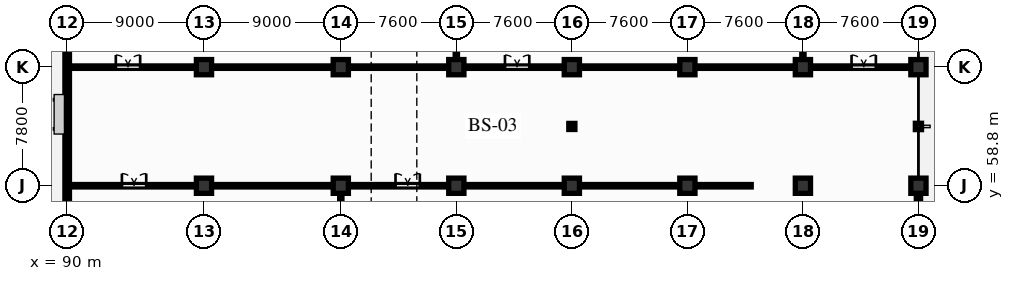
"""IFC4 building model, lengths in metres.
Left out: names, types, materials, properties, quantities, classifications, styles, units other than length and angle.
Written with IfcOpenShell. Run it as: python <this file> out.ifc"""

import sys

from ifc_helpers import new_model, si_unit, direction, frame, frame_2d, origin, origin_2d, place, context, subcontext, project, spatial, rectangle, i_section, extrude, element, fill, save


model = new_model("IFC4")
c1 = context("Model", 3, precision=1e-05, world=origin(), true_north=direction((0.0, 1.0)))
c2 = subcontext(c1, "Body", "Model", "MODEL_VIEW")
j1 = project(units=[si_unit("LENGTHUNIT", "METRE"), si_unit("PLANEANGLEUNIT", "RADIAN")], contexts=[c1])
p1 = place(None, origin())
s1 = spatial("IfcSite", under=j1, at=p1, CompositionType="ELEMENT")
p2 = place(p1, origin())
s2 = spatial("IfcBuilding", under=s1, at=p2, CompositionType="ELEMENT")
p3 = place(p2, origin())
s3 = spatial("IfcBuildingStorey", under=s2, at=p3, CompositionType="ELEMENT", Elevation=0.0)
for number, where, z_axis, x_axis in (
    (1, (99.0, 58.8, 0.0), (0.0, 0.0, 1.0), (1.0, 0.0, 0.0)),
    (2, (99.0, 66.6, 0.0), (0.0, 0.0, 1.0), (1.0, 0.0, 0.0)),
    (3, (108.0, 58.8, 0.0), (0.0, 0.0, 1.0), (1.0, 0.0, 0.0)),
    (4, (108.0, 66.6, 0.0), (0.0, 0.0, 1.0), (1.0, 0.0, 0.0)),
    (5, (115.6, 58.8, 0.0), (0.0, 0.0, 1.0), (1.0, 0.0, 0.0)),
    (6, (115.6, 66.6, 0.0), (0.0, 0.0, 1.0), (1.0, 0.0, 0.0)),
    (7, (123.2, 58.8, 0.0), (0.0, 0.0, 1.0), (1.0, 0.0, 0.0)),
    (8, (123.2, 66.6, 0.0), (0.0, 0.0, 1.0), (1.0, 0.0, 0.0)),
    (9, (130.8, 58.8, 0.0), (0.0, 0.0, 1.0), (1.0, 0.0, 0.0)),
    (10, (130.8, 66.6, 0.0), (0.0, 0.0, 1.0), (1.0, 0.0, 0.0)),
    (11, (138.4, 58.8, 0.0), (0.0, 0.0, 1.0), (1.0, 0.0, 0.0)),
    (12, (138.4, 66.6, 0.0), (0.0, 0.0, 1.0), (1.0, 0.0, 0.0)),
    (13, (146.0, 58.8, 0.0), (0.0, 0.0, 1.0), (1.0, 0.0, 0.0)),
    (14, (146.0, 66.6, 0.0), (0.0, 0.0, 1.0), (1.0, 0.0, 0.0)),
):
    element("IfcColumn", number, at=place(p3, frame(where, z_axis=z_axis, x_axis=x_axis)), inside=s3, PredefinedType="COLUMN", context=c2, shape_type="SweptSolid", body=[
        extrude(rectangle(XDim=1.0, YDim=1.0, at=origin_2d()), origin(), (0.0, 0.0, 1.0), 5.1),
    ])
p4 = place(p3, frame((123.2, 62.7, 0.0), z_axis=(0.0, 0.0, 1.0), x_axis=(1.0, 0.0, 0.0)))
e15 = element("IfcColumn", 15, at=p4, inside=s3, PredefinedType="COLUMN", context=c2, shape_type="SweptSolid", body=[
    extrude(i_section(OverallWidth=0.401, OverallDepth=0.399, WebThickness=0.025, FlangeThickness=0.04, at=origin_2d()), origin(), (0.0, 0.0, 1.0), 5.1),
])
p5 = place(p3, frame((146.0, 62.7, 0.0), z_axis=(0.0, 0.0, 1.0), x_axis=(1.0, 0.0, 0.0)))
e16 = element("IfcColumn", 16, at=p5, inside=s3, PredefinedType="COLUMN", context=c2, shape_type="SweptSolid", body=[
    extrude(i_section(OverallWidth=0.406, OverallDepth=0.417, WebThickness=0.03, FlangeThickness=0.048, at=origin_2d()), origin(), (0.0, 0.0, 1.0), 5.1),
])
p6 = place(p3, frame((90.0, 43.2, 0.0), z_axis=(0.0, 0.0, 1.0), x_axis=(0.0, 1.0, 0.0)))
e17 = element("IfcWall", 17, at=p6, inside=s3, PredefinedType="SOLIDWALL", context=c2, shape_type="SweptSolid", body=[
    extrude(rectangle(XDim=31.2, YDim=0.3, at=frame_2d((15.6, 0.0))), origin(), (0.0, 0.0, 1.0), 5.25),
])
p7 = place(p6, frame((3.5, 0.0, 0.9)))
e18 = element("IfcOpeningElement", 18, at=p7, cuts=e17, PredefinedType="OPENING", context=c2, shape_type="SweptSolid", body=[
    extrude(rectangle(XDim=1.6, YDim=2.05, at=frame_2d((0.8, 1.025))), frame((0.0, 0.16, 0.0), z_axis=(0.0, -1.0, 0.0), x_axis=(1.0, 0.0, 0.0)), (0.0, 0.0, 1.0), 0.32),
])
p8 = place(p6, frame((11.5, 0.0, 0.9)))
e19 = element("IfcOpeningElement", 19, at=p8, cuts=e17, PredefinedType="OPENING", context=c2, shape_type="SweptSolid", body=[
    extrude(rectangle(XDim=1.8, YDim=2.1, at=frame_2d((0.9, 1.05))), frame((0.0, 0.16, 0.0), z_axis=(0.0, -1.0, 0.0), x_axis=(1.0, 0.0, 0.0)), (0.0, 0.0, 1.0), 0.32),
])
p9 = place(p6, frame((19.5, 0.0, 0.9)))
e20 = element("IfcOpeningElement", 20, at=p9, cuts=e17, PredefinedType="OPENING", context=c2, shape_type="SweptSolid", body=[
    extrude(rectangle(XDim=1.6, YDim=2.05, at=frame_2d((0.8, 1.025))), frame((0.0, 0.16, 0.0), z_axis=(0.0, -1.0, 0.0), x_axis=(1.0, 0.0, 0.0)), (0.0, 0.0, 1.0), 0.32),
])
p10 = place(p6, frame((26.2, 0.0, 0.9)))
e21 = element("IfcOpeningElement", 21, at=p10, cuts=e17, PredefinedType="OPENING", context=c2, shape_type="SweptSolid", body=[
    extrude(rectangle(XDim=1.2, YDim=2.1, at=frame_2d((0.6, 1.05))), frame((0.0, 0.16, 0.0), z_axis=(0.0, -1.0, 0.0), x_axis=(1.0, 0.0, 0.0)), (0.0, 0.0, 1.0), 0.32),
])
p11 = place(p3, frame((146.0, 51.0, 0.0), z_axis=(0.0, 0.0, 1.0), x_axis=(0.0, 1.0, 0.0)))
e22 = element("IfcWall", 22, at=p11, inside=s3, PredefinedType="SOLIDWALL", context=c2, shape_type="SweptSolid", body=[
    extrude(rectangle(XDim=7.8, YDim=0.28, at=frame_2d((3.9, 0.0))), origin(), (0.0, 0.0, 1.0), 4.8),
])
p12 = place(p11, frame((2.6, 0.0, 0.0)))
e23 = element("IfcOpeningElement", 23, at=p12, cuts=e22, PredefinedType="OPENING", context=c2, shape_type="SweptSolid", body=[
    extrude(rectangle(XDim=1.8, YDim=2.6, at=frame_2d((0.9, 1.3))), frame((0.0, 0.15, 0.0), z_axis=(0.0, -1.0, 0.0), x_axis=(1.0, 0.0, 0.0)), (0.0, 0.0, 1.0), 0.3),
])
p13 = place(p3, frame((90.0, 58.8, 0.0), z_axis=(0.0, 0.0, 1.0), x_axis=(1.0, 0.0, 0.0)))
e24 = element("IfcWall", 24, at=p13, inside=s3, PredefinedType="PARTITIONING", context=c2, shape_type="SweptSolid", body=[
    extrude(rectangle(XDim=18.0, YDim=0.16, at=frame_2d((9.0, 0.0))), origin(), (0.0, 0.0, 1.0), 4.153),
])
p14 = place(p13, frame((3.6, 0.0, 0.0)))
e25 = element("IfcOpeningElement", 25, at=p14, cuts=e24, PredefinedType="OPENING", context=c2, shape_type="SweptSolid", body=[
    extrude(rectangle(XDim=1.6, YDim=2.2, at=frame_2d((0.8, 1.1))), frame((0.0, 0.09, 0.0), z_axis=(0.0, -1.0, 0.0), x_axis=(1.0, 0.0, 0.0)), (0.0, 0.0, 1.0), 0.18),
])
p15 = place(p3, frame((108.0, 58.8, 0.0), z_axis=(0.0, 0.0, 1.0), x_axis=(1.0, 0.0, 0.0)))
e26 = element("IfcWall", 26, at=p15, inside=s3, PredefinedType="PARTITIONING", context=c2, shape_type="SweptSolid", body=[
    extrude(rectangle(XDim=27.0, YDim=0.16, at=frame_2d((13.5, 0.0))), origin(), (0.0, 0.0, 1.0), 4.163),
])
p16 = place(p15, frame((3.6, 0.0, 0.0)))
e27 = element("IfcOpeningElement", 27, at=p16, cuts=e26, PredefinedType="OPENING", context=c2, shape_type="SweptSolid", body=[
    extrude(rectangle(XDim=1.6, YDim=2.2, at=frame_2d((0.8, 1.1))), frame((0.0, 0.09, 0.0), z_axis=(0.0, -1.0, 0.0), x_axis=(1.0, 0.0, 0.0)), (0.0, 0.0, 1.0), 0.18),
])
p17 = place(p3, frame((108.0, 43.2, 0.0), z_axis=(0.0, 0.0, 1.0), x_axis=(0.0, 1.0, 0.0)))
e28 = element("IfcWall", 28, at=p17, inside=s3, PredefinedType="PARTITIONING", context=c2, shape_type="SweptSolid", body=[
    extrude(rectangle(XDim=15.6, YDim=0.15, at=frame_2d((7.8, 0.0))), origin(), (0.0, 0.0, 1.0), 4.308),
])
p18 = place(p3, frame((90.0, 66.6, 0.0), z_axis=(0.0, 0.0, 1.0), x_axis=(1.0, 0.0, 0.0)))
e29 = element("IfcWall", 29, at=p18, inside=s3, PredefinedType="PARTITIONING", context=c2, shape_type="SweptSolid", body=[
    extrude(rectangle(XDim=25.6, YDim=0.16, at=frame_2d((12.8, 0.0))), origin(), (0.0, 0.0, 1.0), 4.153),
])
p19 = place(p18, frame((3.2, 0.0, 0.0)))
e30 = element("IfcOpeningElement", 30, at=p19, cuts=e29, PredefinedType="OPENING", context=c2, shape_type="SweptSolid", body=[
    extrude(rectangle(XDim=1.6, YDim=2.2, at=frame_2d((0.8, 1.1))), frame((0.0, 0.09, 0.0), z_axis=(0.0, -1.0, 0.0), x_axis=(1.0, 0.0, 0.0)), (0.0, 0.0, 1.0), 0.18),
])
p20 = place(p3, frame((115.6, 66.6, 0.0), z_axis=(0.0, 0.0, 1.0), x_axis=(1.0, 0.0, 0.0)))
e31 = element("IfcWall", 31, at=p20, inside=s3, PredefinedType="PARTITIONING", context=c2, shape_type="SweptSolid", body=[
    extrude(rectangle(XDim=22.8, YDim=0.16, at=frame_2d((11.4, 0.0))), origin(), (0.0, 0.0, 1.0), 4.163),
])
p21 = place(p20, frame((3.2, 0.0, 0.0)))
e32 = element("IfcOpeningElement", 32, at=p21, cuts=e31, PredefinedType="OPENING", context=c2, shape_type="SweptSolid", body=[
    extrude(rectangle(XDim=1.6, YDim=2.2, at=frame_2d((0.8, 1.1))), frame((0.0, 0.09, 0.0), z_axis=(0.0, -1.0, 0.0), x_axis=(1.0, 0.0, 0.0)), (0.0, 0.0, 1.0), 0.18),
])
p22 = place(p3, frame((115.6, 66.6, 0.0), z_axis=(0.0, 0.0, 1.0), x_axis=(0.0, 1.0, 0.0)))
e33 = element("IfcWall", 33, at=p22, inside=s3, PredefinedType="PARTITIONING", context=c2, shape_type="SweptSolid", body=[
    extrude(rectangle(XDim=15.6, YDim=0.15, at=frame_2d((7.8, 0.0))), origin(), (0.0, 0.0, 1.0), 4.163),
])
p23 = place(p3, frame((138.4, 66.6, 0.0), z_axis=(0.0, 0.0, 1.0), x_axis=(1.0, 0.0, 0.0)))
e34 = element("IfcWall", 34, at=p23, inside=s3, PredefinedType="PARTITIONING", context=c2, shape_type="SweptSolid", body=[
    extrude(rectangle(XDim=7.6, YDim=0.16, at=frame_2d((3.8, 0.0))), origin(), (0.0, 0.0, 1.0), 4.163),
])
p24 = place(p23, frame((3.2, 0.0, 0.0)))
e35 = element("IfcOpeningElement", 35, at=p24, cuts=e34, PredefinedType="OPENING", context=c2, shape_type="SweptSolid", body=[
    extrude(rectangle(XDim=1.6, YDim=2.2, at=frame_2d((0.8, 1.1))), frame((0.0, 0.09, 0.0), z_axis=(0.0, -1.0, 0.0), x_axis=(1.0, 0.0, 0.0)), (0.0, 0.0, 1.0), 0.18),
])
p25 = place(p3, frame((138.4, 66.6, 0.0), z_axis=(0.0, 0.0, 1.0), x_axis=(0.0, 1.0, 0.0)))
e36 = element("IfcWall", 36, at=p25, inside=s3, PredefinedType="PARTITIONING", context=c2, shape_type="SweptSolid", body=[
    extrude(rectangle(XDim=15.6, YDim=0.15, at=frame_2d((7.8, 0.0))), origin(), (0.0, 0.0, 1.0), 4.163),
])
p26 = place(p9, origin())
e37 = element("IfcWindow", 37, at=p26, inside=s3, PartitioningType="SINGLE_PANEL", PredefinedType="WINDOW", context=c2, shape_type="SweptSolid", body=[
    extrude(rectangle(XDim=1.6, YDim=2.05, at=frame_2d((0.8, 1.025))), frame((0.0, 0.03, 0.0), z_axis=(0.0, -1.0, 0.0), x_axis=(1.0, 0.0, 0.0)), (0.0, 0.0, 1.0), 0.06),
])
fill(e20, e37)
p27 = place(p14, origin())
e38 = element("IfcDoor", 38, at=p27, inside=s3, OperationType="DOUBLE_DOOR_SINGLE_SWING", PredefinedType="DOOR", context=c2, shape_type="SweptSolid", body=[
    extrude(rectangle(XDim=1.6, YDim=2.2, at=frame_2d((0.8, 1.1))), frame((0.0, 0.025, 0.0), z_axis=(0.0, -1.0, 0.0), x_axis=(1.0, 0.0, 0.0)), (0.0, 0.0, 1.0), 0.05),
])
fill(e25, e38)
p28 = place(p16, origin())
e39 = element("IfcDoor", 39, at=p28, inside=s3, OperationType="DOUBLE_DOOR_SINGLE_SWING", PredefinedType="DOOR", context=c2, shape_type="SweptSolid", body=[
    extrude(rectangle(XDim=1.6, YDim=2.2, at=frame_2d((0.8, 1.1))), frame((0.0, 0.025, 0.0), z_axis=(0.0, -1.0, 0.0), x_axis=(1.0, 0.0, 0.0)), (0.0, 0.0, 1.0), 0.05),
])
fill(e27, e39)
p29 = place(p19, origin())
e40 = element("IfcDoor", 40, at=p29, inside=s3, OperationType="DOUBLE_DOOR_SINGLE_SWING", PredefinedType="DOOR", context=c2, shape_type="SweptSolid", body=[
    extrude(rectangle(XDim=1.6, YDim=2.2, at=frame_2d((0.8, 1.1))), frame((0.0, 0.025, 0.0), z_axis=(0.0, -1.0, 0.0), x_axis=(1.0, 0.0, 0.0)), (0.0, 0.0, 1.0), 0.05),
])
fill(e30, e40)
p30 = place(p21, origin())
e41 = element("IfcDoor", 41, at=p30, inside=s3, OperationType="DOUBLE_DOOR_SINGLE_SWING", PredefinedType="DOOR", context=c2, shape_type="SweptSolid", body=[
    extrude(rectangle(XDim=1.6, YDim=2.2, at=frame_2d((0.8, 1.1))), frame((0.0, 0.025, 0.0), z_axis=(0.0, -1.0, 0.0), x_axis=(1.0, 0.0, 0.0)), (0.0, 0.0, 1.0), 0.05),
])
fill(e32, e41)
p31 = place(p24, origin())
e42 = element("IfcDoor", 42, at=p31, inside=s3, OperationType="DOUBLE_DOOR_SINGLE_SWING", PredefinedType="DOOR", context=c2, shape_type="SweptSolid", body=[
    extrude(rectangle(XDim=1.6, YDim=2.2, at=frame_2d((0.8, 1.1))), frame((0.0, 0.025, 0.0), z_axis=(0.0, -1.0, 0.0), x_axis=(1.0, 0.0, 0.0)), (0.0, 0.0, 1.0), 0.05),
])
fill(e35, e42)
save(model, sys.argv[1])
